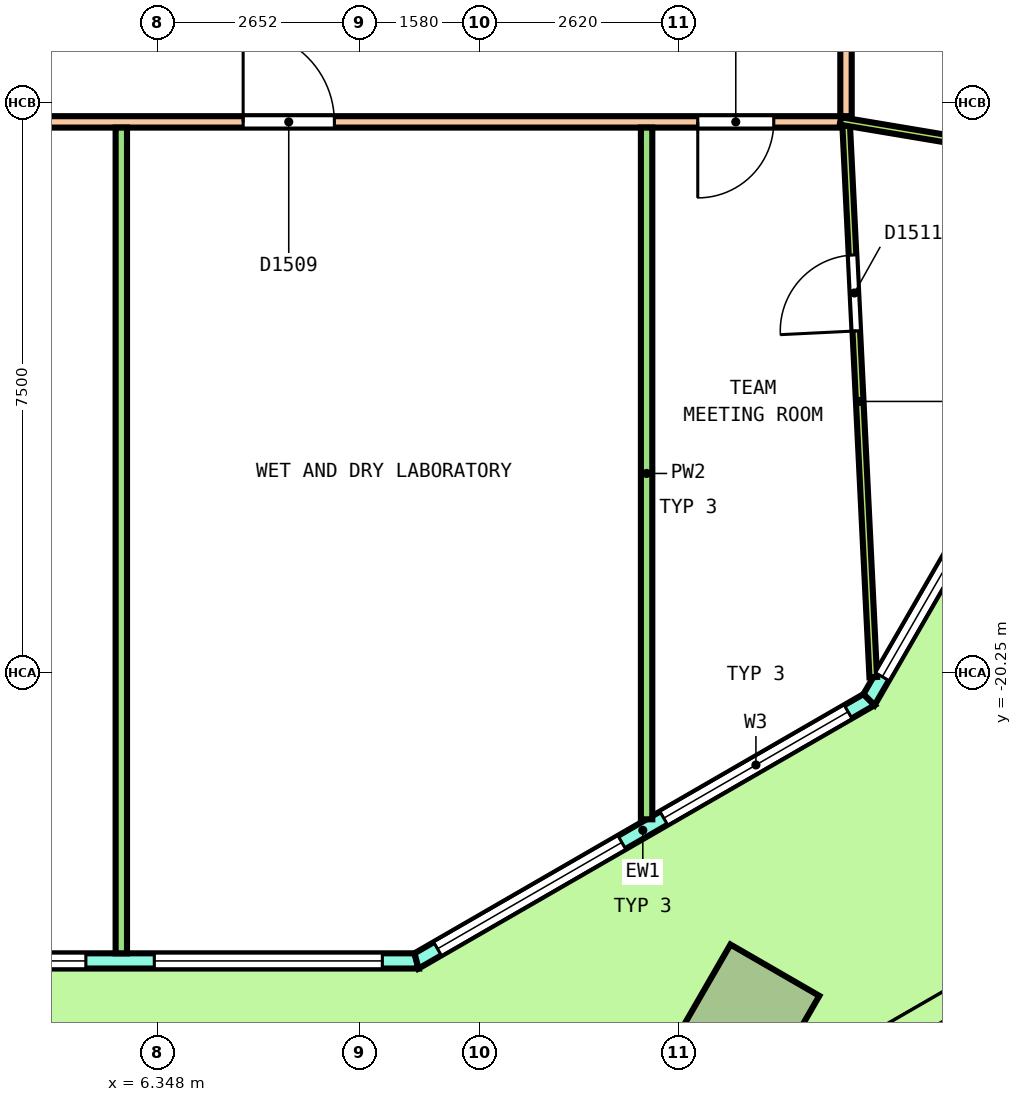
"""IFC4 building model, lengths in metres.
Left out: names, types, materials, properties, quantities, classifications, styles, units other than length and angle.
Written with IfcOpenShell. Run it as: python <this file> out.ifc"""

import sys

from ifc_helpers import new_model, si_unit, direction, frame, frame_2d, origin, origin_2d, place, context, subcontext, project, spatial, polyline, rectangle, outline, extrude, element, fill, save


model = new_model("IFC4")
c1 = context("Model", 3, precision=1e-05, world=origin(), true_north=direction((0.0, 1.0)))
c2 = subcontext(c1, "Body", "Model", "MODEL_VIEW")
j1 = project(units=[si_unit("LENGTHUNIT", "METRE"), si_unit("PLANEANGLEUNIT", "RADIAN")], contexts=[c1])
p1 = place(None, origin())
s1 = spatial("IfcSite", under=j1, at=p1, CompositionType="ELEMENT")
p2 = place(p1, origin())
s2 = spatial("IfcBuilding", under=s1, at=p2, CompositionType="ELEMENT")
p3 = place(p2, frame((0.0, 0.0, 85.2)))
s3 = spatial("IfcBuildingStorey", under=s2, at=p3, CompositionType="ELEMENT", Elevation=85.2)
p4 = place(p3, frame((14.127, -24.744, 0.0), z_axis=(-0.018192817002, -0.0314458625, 0.999339871686), x_axis=(0.866186210709, 0.498729969757, 0.031462130318)))
e1 = element("IfcColumn", 1, at=p4, inside=s3, PredefinedType="COLUMN", context=c2, shape_type="SweptSolid", body=[
    extrude(rectangle(XDim=1.35, YDim=1.35, at=origin_2d()), origin(), (0.0, 0.0, 1.0), 4.053),
])
p5 = place(p3, frame((-9.75, -24.038, 0.0), z_axis=(0.0, 0.0, 1.0), x_axis=(1.0, 0.0, 0.0)))
e2 = element("IfcWall", 2, at=p5, inside=s3, PredefinedType="SOLIDWALL", context=c2, shape_type="SweptSolid", body=[
    extrude(outline(polyline([(-0.027, -0.1), (1.002, -0.1), (2.031, -0.1), (3.061, -0.1), (4.09, -0.1), (5.119, -0.1), (6.148, -0.1), (7.177, -0.1), (8.206, -0.1), (9.235, -0.1), (10.264, -0.1), (11.293, -0.1), (12.323, -0.1), (13.352, -0.1), (14.381, -0.1), (15.41, -0.1), (16.439, -0.1), (17.468, -0.1), (18.497, -0.1), (19.526, -0.1), (19.473, 0.1), (18.449, 0.1), (17.426, 0.1), (16.402, 0.1), (15.379, 0.1), (14.355, 0.1), (13.332, 0.1), (12.308, 0.1), (11.285, 0.1), (10.261, 0.1), (9.238, 0.1), (8.215, 0.1), (7.191, 0.1), (6.168, 0.1), (5.144, 0.1), (4.121, 0.1), (3.097, 0.1), (2.074, 0.1), (1.05, 0.1), (0.027, 0.1), (-0.027, -0.1)])), origin(), (0.0, 0.0, 1.0), 4.1),
])
p6 = place(p5, frame((0.45, 0.0, 0.1)))
e3 = element("IfcOpeningElement", 3, at=p6, cuts=e2, PredefinedType="OPENING", context=c2, shape_type="SweptSolid", body=[
    extrude(rectangle(XDim=3.0, YDim=2.9, at=frame_2d((1.5, 1.45))), frame((0.0, 0.11, 0.0), z_axis=(0.0, -1.0, 0.0), x_axis=(1.0, 0.0, 0.0)), (0.0, 0.0, 1.0), 0.22),
])
p7 = place(p5, frame((4.35, 0.0, 0.1)))
e4 = element("IfcOpeningElement", 4, at=p7, cuts=e2, PredefinedType="OPENING", context=c2, shape_type="SweptSolid", body=[
    extrude(rectangle(XDim=3.0, YDim=2.9, at=frame_2d((1.5, 1.45))), frame((0.0, 0.11, 0.0), z_axis=(0.0, -1.0, 0.0), x_axis=(1.0, 0.0, 0.0)), (0.0, 0.0, 1.0), 0.22),
])
p8 = place(p5, frame((8.85, 0.0, 0.0)))
e5 = element("IfcOpeningElement", 5, at=p8, cuts=e2, PredefinedType="OPENING", context=c2, shape_type="SweptSolid", body=[
    extrude(rectangle(XDim=1.8, YDim=2.4, at=frame_2d((0.9, 1.2))), frame((0.0, 0.11, 0.0), z_axis=(0.0, -1.0, 0.0), x_axis=(1.0, 0.0, 0.0)), (0.0, 0.0, 1.0), 0.22),
])
p9 = place(p5, frame((8.85, 0.0, 2.55)))
e6 = element("IfcOpeningElement", 6, at=p9, cuts=e2, PredefinedType="OPENING", context=c2, shape_type="SweptSolid", body=[
    extrude(rectangle(XDim=1.8, YDim=0.45, at=frame_2d((0.9, 0.225))), frame((0.0, 0.11, 0.0), z_axis=(0.0, -1.0, 0.0), x_axis=(1.0, 0.0, 0.0)), (0.0, 0.0, 1.0), 0.22),
])
p10 = place(p5, frame((12.15, 0.0, 0.1)))
e7 = element("IfcOpeningElement", 7, at=p10, cuts=e2, PredefinedType="OPENING", context=c2, shape_type="SweptSolid", body=[
    extrude(rectangle(XDim=3.0, YDim=2.9, at=frame_2d((1.5, 1.45))), frame((0.0, 0.11, 0.0), z_axis=(0.0, -1.0, 0.0), x_axis=(1.0, 0.0, 0.0)), (0.0, 0.0, 1.0), 0.22),
])
p11 = place(p5, frame((16.05, 0.0, 0.1)))
e8 = element("IfcOpeningElement", 8, at=p11, cuts=e2, PredefinedType="OPENING", context=c2, shape_type="SweptSolid", body=[
    extrude(rectangle(XDim=3.0, YDim=2.9, at=frame_2d((1.5, 1.45))), frame((0.0, 0.11, 0.0), z_axis=(0.0, -1.0, 0.0), x_axis=(1.0, 0.0, 0.0)), (0.0, 0.0, 1.0), 0.22),
])
p12 = place(p3, frame((9.75, -24.038, 0.0), z_axis=(0.0, 0.0, 1.0), x_axis=(0.866029458321, 0.49999297727, 0.0)))
e9 = element("IfcWall", 9, at=p12, inside=s3, PredefinedType="SOLIDWALL", context=c2, shape_type="SweptSolid", body=[
    extrude(outline(polyline([(-0.027, -0.1), (1.128, -0.1), (2.282, -0.1), (3.437, -0.1), (4.592, -0.1), (5.747, -0.1), (6.901, -0.1), (6.848, 0.1), (5.711, 0.1), (4.574, 0.1), (3.437, 0.1), (2.301, 0.1), (1.164, 0.1), (0.027, 0.1), (-0.027, -0.1)])), origin(), (0.0, 0.0, 1.0), 4.1),
])
p13 = place(p12, frame((0.319, 0.0, 0.1)))
e10 = element("IfcOpeningElement", 10, at=p13, cuts=e9, PredefinedType="OPENING", context=c2, shape_type="SweptSolid", body=[
    extrude(rectangle(XDim=2.8, YDim=2.9, at=frame_2d((1.4, 1.45))), frame((0.0, 0.11, 0.0), z_axis=(0.0, -1.0, 0.0), x_axis=(1.0, 0.0, 0.0)), (0.0, 0.0, 1.0), 0.22),
])
p14 = place(p12, frame((3.756, 0.0, 0.1)))
e11 = element("IfcOpeningElement", 11, at=p14, cuts=e9, PredefinedType="OPENING", context=c2, shape_type="SweptSolid", body=[
    extrude(rectangle(XDim=2.8, YDim=2.9, at=frame_2d((1.4, 1.45))), frame((0.0, 0.11, 0.0), z_axis=(0.0, -1.0, 0.0), x_axis=(1.0, 0.0, 0.0)), (0.0, 0.0, 1.0), 0.22),
])
p15 = place(p3, frame((15.703, -20.601, 0.0), z_axis=(0.0, 0.0, 1.0), x_axis=(0.499997834957, 0.866026653769, 0.0)))
e12 = element("IfcWall", 12, at=p15, inside=s3, PredefinedType="SOLIDWALL", context=c2, shape_type="SweptSolid", body=[
    extrude(outline(polyline([(-0.027, -0.1), (1.028, -0.1), (2.082, -0.1), (3.136, -0.1), (4.19, -0.1), (5.245, -0.1), (6.299, -0.1), (7.354, -0.1), (8.408, -0.1), (9.462, -0.1), (10.516, -0.1), (11.571, -0.1), (12.625, -0.1), (13.679, -0.1), (14.734, -0.1), (15.788, -0.1), (16.842, -0.1), (17.897, -0.1), (18.951, -0.1), (20.005, -0.1), (19.952, 0.1), (18.903, 0.1), (17.854, 0.1), (16.806, 0.1), (15.757, 0.1), (14.708, 0.1), (13.66, 0.1), (12.611, 0.1), (11.562, 0.1), (10.514, 0.1), (9.465, 0.1), (8.416, 0.1), (7.368, 0.1), (6.319, 0.1), (5.27, 0.1), (4.221, 0.1), (3.173, 0.1), (2.124, 0.1), (1.075, 0.1), (0.027, 0.1), (-0.027, -0.1)])), origin(), (0.0, 0.0, 1.0), 4.1),
])
p16 = place(p15, frame((0.348, 0.0, 0.1)))
e13 = element("IfcOpeningElement", 13, at=p16, cuts=e12, PredefinedType="OPENING", context=c2, shape_type="SweptSolid", body=[
    extrude(rectangle(XDim=3.3, YDim=2.9, at=frame_2d((1.65, 1.45))), frame((0.0, 0.11, 0.0), z_axis=(0.0, -1.0, 0.0), x_axis=(1.0, 0.0, 0.0)), (0.0, 0.0, 1.0), 0.22),
])
p17 = place(p15, frame((4.344, 0.0, 0.1)))
e14 = element("IfcOpeningElement", 14, at=p17, cuts=e12, PredefinedType="OPENING", context=c2, shape_type="SweptSolid", body=[
    extrude(rectangle(XDim=3.3, YDim=2.9, at=frame_2d((1.65, 1.45))), frame((0.0, 0.11, 0.0), z_axis=(0.0, -1.0, 0.0), x_axis=(1.0, 0.0, 0.0)), (0.0, 0.0, 1.0), 0.22),
])
p18 = place(p15, frame((9.089, 0.0, 0.0)))
e15 = element("IfcOpeningElement", 15, at=p18, cuts=e12, PredefinedType="OPENING", context=c2, shape_type="SweptSolid", body=[
    extrude(rectangle(XDim=1.8, YDim=2.4, at=frame_2d((0.9, 1.2))), frame((0.0, 0.11, 0.0), z_axis=(0.0, -1.0, 0.0), x_axis=(1.0, 0.0, 0.0)), (0.0, 0.0, 1.0), 0.22),
])
p19 = place(p15, frame((9.089, 0.0, 2.55)))
e16 = element("IfcOpeningElement", 16, at=p19, cuts=e12, PredefinedType="OPENING", context=c2, shape_type="SweptSolid", body=[
    extrude(rectangle(XDim=1.8, YDim=0.45, at=frame_2d((0.9, 0.225))), frame((0.0, 0.11, 0.0), z_axis=(0.0, -1.0, 0.0), x_axis=(1.0, 0.0, 0.0)), (0.0, 0.0, 1.0), 0.22),
])
p20 = place(p15, frame((12.335, 0.0, 0.1)))
e17 = element("IfcOpeningElement", 17, at=p20, cuts=e12, PredefinedType="OPENING", context=c2, shape_type="SweptSolid", body=[
    extrude(rectangle(XDim=3.3, YDim=2.9, at=frame_2d((1.65, 1.45))), frame((0.0, 0.11, 0.0), z_axis=(0.0, -1.0, 0.0), x_axis=(1.0, 0.0, 0.0)), (0.0, 0.0, 1.0), 0.22),
])
p21 = place(p15, frame((16.331, 0.0, 0.1)))
e18 = element("IfcOpeningElement", 18, at=p21, cuts=e12, PredefinedType="OPENING", context=c2, shape_type="SweptSolid", body=[
    extrude(rectangle(XDim=3.3, YDim=2.9, at=frame_2d((1.65, 1.45))), frame((0.0, 0.11, 0.0), z_axis=(0.0, -1.0, 0.0), x_axis=(1.0, 0.0, 0.0)), (0.0, 0.0, 1.0), 0.22),
])
p22 = place(p3, frame((15.4, -12.925, 0.0), z_axis=(0.0, 0.0, 1.0), x_axis=(0.0, 1.0, 0.0)))
e19 = element("IfcWall", 19, at=p22, inside=s3, PredefinedType="PARTITIONING", context=c2, shape_type="SweptSolid", body=[
    extrude(rectangle(XDim=25.85, YDim=0.15, at=frame_2d((12.925, 0.0))), origin(), (0.0, 0.0, 1.0), 3.05),
])
p23 = place(p22, frame((15.393, 0.0, 0.0)))
e20 = element("IfcOpeningElement", 20, at=p23, cuts=e19, PredefinedType="OPENING", context=c2, shape_type="SweptSolid", body=[
    extrude(rectangle(XDim=1.2, YDim=2.1, at=frame_2d((0.6, 1.05))), frame((0.0, 0.085, 0.0), z_axis=(0.0, -1.0, 0.0), x_axis=(1.0, 0.0, 0.0)), (0.0, 0.0, 1.0), 0.17),
])
p24 = place(p22, frame((22.936, 0.0, 0.0)))
e21 = element("IfcOpeningElement", 21, at=p24, cuts=e19, PredefinedType="OPENING", context=c2, shape_type="SweptSolid", body=[
    extrude(rectangle(XDim=1.2, YDim=2.1, at=frame_2d((0.6, 1.05))), frame((0.0, 0.085, 0.0), z_axis=(0.0, -1.0, 0.0), x_axis=(1.0, 0.0, 0.0)), (0.0, 0.0, 1.0), 0.17),
])
p25 = place(p22, frame((1.852, 0.0, 0.0)))
e22 = element("IfcOpeningElement", 22, at=p25, cuts=e19, PredefinedType="OPENING", context=c2, shape_type="SweptSolid", body=[
    extrude(rectangle(XDim=1.0, YDim=2.1, at=frame_2d((0.5, 1.05))), frame((0.0, 0.085, 0.0), z_axis=(0.0, -1.0, 0.0), x_axis=(1.0, 0.0, 0.0)), (0.0, 0.0, 1.0), 0.17),
])
p26 = place(p3, frame((-15.35, -13.0, 0.0), z_axis=(0.0, 0.0, 1.0), x_axis=(1.0, 0.0, 0.0)))
e23 = element("IfcWall", 23, at=p26, inside=s3, PredefinedType="PARTITIONING", context=c2, shape_type="SweptSolid", body=[
    extrude(rectangle(XDim=30.7, YDim=0.15, at=frame_2d((15.35, 0.0))), origin(), (0.0, 0.0, 1.0), 3.05),
])
p27 = place(p26, frame((2.262, 0.0, 0.0)))
e24 = element("IfcOpeningElement", 24, at=p27, cuts=e23, PredefinedType="OPENING", context=c2, shape_type="SweptSolid", body=[
    extrude(rectangle(XDim=1.0, YDim=2.1, at=frame_2d((0.5, 1.05))), frame((0.0, 0.085, 0.0), z_axis=(0.0, -1.0, 0.0), x_axis=(1.0, 0.0, 0.0)), (0.0, 0.0, 1.0), 0.17),
])
p28 = place(p26, frame((10.514, 0.0, 0.0)))
e25 = element("IfcOpeningElement", 25, at=p28, cuts=e23, PredefinedType="OPENING", context=c2, shape_type="SweptSolid", body=[
    extrude(rectangle(XDim=1.0, YDim=2.1, at=frame_2d((0.5, 1.05))), frame((0.0, 0.085, 0.0), z_axis=(0.0, -1.0, 0.0), x_axis=(1.0, 0.0, 0.0)), (0.0, 0.0, 1.0), 0.17),
])
p29 = place(p26, frame((15.225, 0.0, 0.0)))
e26 = element("IfcOpeningElement", 26, at=p29, cuts=e23, PredefinedType="OPENING", context=c2, shape_type="SweptSolid", body=[
    extrude(rectangle(XDim=1.2, YDim=2.1, at=frame_2d((0.6, 1.05))), frame((0.0, 0.085, 0.0), z_axis=(0.0, -1.0, 0.0), x_axis=(1.0, 0.0, 0.0)), (0.0, 0.0, 1.0), 0.17),
])
p30 = place(p26, frame((22.819, 0.0, 0.0)))
e27 = element("IfcOpeningElement", 27, at=p30, cuts=e23, PredefinedType="OPENING", context=c2, shape_type="SweptSolid", body=[
    extrude(rectangle(XDim=1.2, YDim=2.1, at=frame_2d((0.6, 1.05))), frame((0.0, 0.085, 0.0), z_axis=(0.0, -1.0, 0.0), x_axis=(1.0, 0.0, 0.0)), (0.0, 0.0, 1.0), 0.17),
])
p31 = place(p26, frame((28.8, 0.0, 0.0)))
e28 = element("IfcOpeningElement", 28, at=p31, cuts=e23, PredefinedType="OPENING", context=c2, shape_type="SweptSolid", body=[
    extrude(rectangle(XDim=1.0, YDim=2.1, at=frame_2d((0.5, 1.05))), frame((0.0, 0.085, 0.0), z_axis=(0.0, -1.0, 0.0), x_axis=(1.0, 0.0, 0.0)), (0.0, 0.0, 1.0), 0.17),
])
p32 = place(p3, frame((5.866, -23.938, 0.0), z_axis=(0.0, 0.0, 1.0), x_axis=(0.0, 1.0, 0.0)))
e29 = element("IfcWall", 29, at=p32, inside=s3, PredefinedType="PARTITIONING", context=c2, shape_type="SweptSolid", body=[
    extrude(rectangle(XDim=10.863, YDim=0.15, at=frame_2d((5.432, 0.0))), origin(), (0.0, 0.0, 1.0), 3.05),
])
p33 = place(p3, frame((12.777, -22.175, 0.0), z_axis=(0.0, 0.0, 1.0), x_axis=(0.0, 1.0, 0.0)))
e30 = element("IfcWall", 30, at=p33, inside=s3, PredefinedType="PARTITIONING", context=c2, shape_type="SweptSolid", body=[
    extrude(rectangle(XDim=9.1, YDim=0.15, at=frame_2d((4.55, 0.0))), origin(), (0.0, 0.0, 1.0), 3.05),
])
p34 = place(p3, frame((15.403, -13.05, 0.0), z_axis=(0.0, 0.0, 1.0), x_axis=(0.049000591433, -0.998798749518, 0.0)))
e31 = element("IfcWall", 31, at=p34, inside=s3, PredefinedType="PARTITIONING", context=c2, shape_type="SweptSolid", body=[
    extrude(rectangle(XDim=7.264, YDim=0.1, at=frame_2d((3.632, 0.0))), origin(), (0.0, 0.0, 1.0), 3.05),
])
p35 = place(p34, frame((1.704, 0.0, 0.0)))
e32 = element("IfcOpeningElement", 32, at=p35, cuts=e31, PredefinedType="OPENING", context=c2, shape_type="SweptSolid", body=[
    extrude(rectangle(XDim=1.0, YDim=2.1, at=frame_2d((0.5, 1.05))), frame((0.0, 0.06, 0.0), z_axis=(0.0, -1.0, 0.0), x_axis=(1.0, 0.0, 0.0)), (0.0, 0.0, 1.0), 0.12),
])
p36 = place(p3, frame((15.326, -12.988, 0.0), z_axis=(0.0, 0.0, 1.0), x_axis=(0.986237170297, -0.165336759146, 0.0)))
e33 = element("IfcWall", 33, at=p36, inside=s3, PredefinedType="PARTITIONING", context=c2, shape_type="SweptSolid", body=[
    extrude(rectangle(XDim=4.306, YDim=0.1, at=frame_2d((2.153, 0.0))), origin(), (0.0, 0.0, 1.0), 3.05),
])
p37 = place(p10, origin())
e34 = element("IfcWindow", 34, at=p37, inside=s3, PartitioningType="SINGLE_PANEL", PredefinedType="WINDOW", context=c2, shape_type="SweptSolid", body=[
    extrude(rectangle(XDim=3.0, YDim=2.9, at=frame_2d((1.5, 1.45))), frame((0.0, 0.03, 0.0), z_axis=(0.0, -1.0, 0.0), x_axis=(1.0, 0.0, 0.0)), (0.0, 0.0, 1.0), 0.06),
])
fill(e7, e34)
p38 = place(p11, origin())
e35 = element("IfcWindow", 35, at=p38, inside=s3, PartitioningType="SINGLE_PANEL", PredefinedType="WINDOW", context=c2, shape_type="SweptSolid", body=[
    extrude(rectangle(XDim=3.0, YDim=2.9, at=frame_2d((1.5, 1.45))), frame((0.0, 0.03, 0.0), z_axis=(0.0, -1.0, 0.0), x_axis=(1.0, 0.0, 0.0)), (0.0, 0.0, 1.0), 0.06),
])
fill(e8, e35)
p39 = place(p13, origin())
e36 = element("IfcWindow", 36, at=p39, inside=s3, PartitioningType="SINGLE_PANEL", PredefinedType="WINDOW", context=c2, shape_type="SweptSolid", body=[
    extrude(rectangle(XDim=2.8, YDim=2.9, at=frame_2d((1.4, 1.45))), frame((0.0, 0.03, 0.0), z_axis=(0.0, -1.0, 0.0), x_axis=(1.0, 0.0, 0.0)), (0.0, 0.0, 1.0), 0.06),
])
fill(e10, e36)
p40 = place(p14, origin())
e37 = element("IfcWindow", 37, at=p40, inside=s3, PartitioningType="SINGLE_PANEL", PredefinedType="WINDOW", context=c2, shape_type="SweptSolid", body=[
    extrude(rectangle(XDim=2.8, YDim=2.9, at=frame_2d((1.4, 1.45))), frame((0.0, 0.03, 0.0), z_axis=(0.0, -1.0, 0.0), x_axis=(1.0, 0.0, 0.0)), (0.0, 0.0, 1.0), 0.06),
])
fill(e11, e37)
p41 = place(p16, origin())
e38 = element("IfcWindow", 38, at=p41, inside=s3, PartitioningType="SINGLE_PANEL", PredefinedType="WINDOW", context=c2, shape_type="SweptSolid", body=[
    extrude(rectangle(XDim=3.3, YDim=2.9, at=frame_2d((1.65, 1.45))), frame((0.0, 0.03, 0.0), z_axis=(0.0, -1.0, 0.0), x_axis=(1.0, 0.0, 0.0)), (0.0, 0.0, 1.0), 0.06),
])
fill(e13, e38)
p42 = place(p30, origin())
e39 = element("IfcDoor", 39, at=p42, inside=s3, OperationType="DOUBLE_DOOR_SINGLE_SWING", PredefinedType="DOOR", context=c2, shape_type="SweptSolid", body=[
    extrude(rectangle(XDim=1.2, YDim=2.1, at=frame_2d((0.6, 1.05))), frame((0.0, 0.025, 0.0), z_axis=(0.0, -1.0, 0.0), x_axis=(1.0, 0.0, 0.0)), (0.0, 0.0, 1.0), 0.05),
])
fill(e27, e39)
p43 = place(p31, origin())
e40 = element("IfcDoor", 40, at=p43, inside=s3, OperationType="SINGLE_SWING_RIGHT", PredefinedType="DOOR", context=c2, shape_type="SweptSolid", body=[
    extrude(rectangle(XDim=1.0, YDim=2.1, at=frame_2d((0.5, 1.05))), frame((0.0, 0.025, 0.0), z_axis=(0.0, -1.0, 0.0), x_axis=(1.0, 0.0, 0.0)), (0.0, 0.0, 1.0), 0.05),
])
fill(e28, e40)
p44 = place(p35, origin())
e41 = element("IfcDoor", 41, at=p44, inside=s3, OperationType="SINGLE_SWING_RIGHT", PredefinedType="DOOR", context=c2, shape_type="SweptSolid", body=[
    extrude(rectangle(XDim=1.0, YDim=2.1, at=frame_2d((0.5, 1.05))), frame((0.0, 0.025, 0.0), z_axis=(0.0, -1.0, 0.0), x_axis=(1.0, 0.0, 0.0)), (0.0, 0.0, 1.0), 0.05),
])
fill(e32, e41)
save(model, sys.argv[1])
